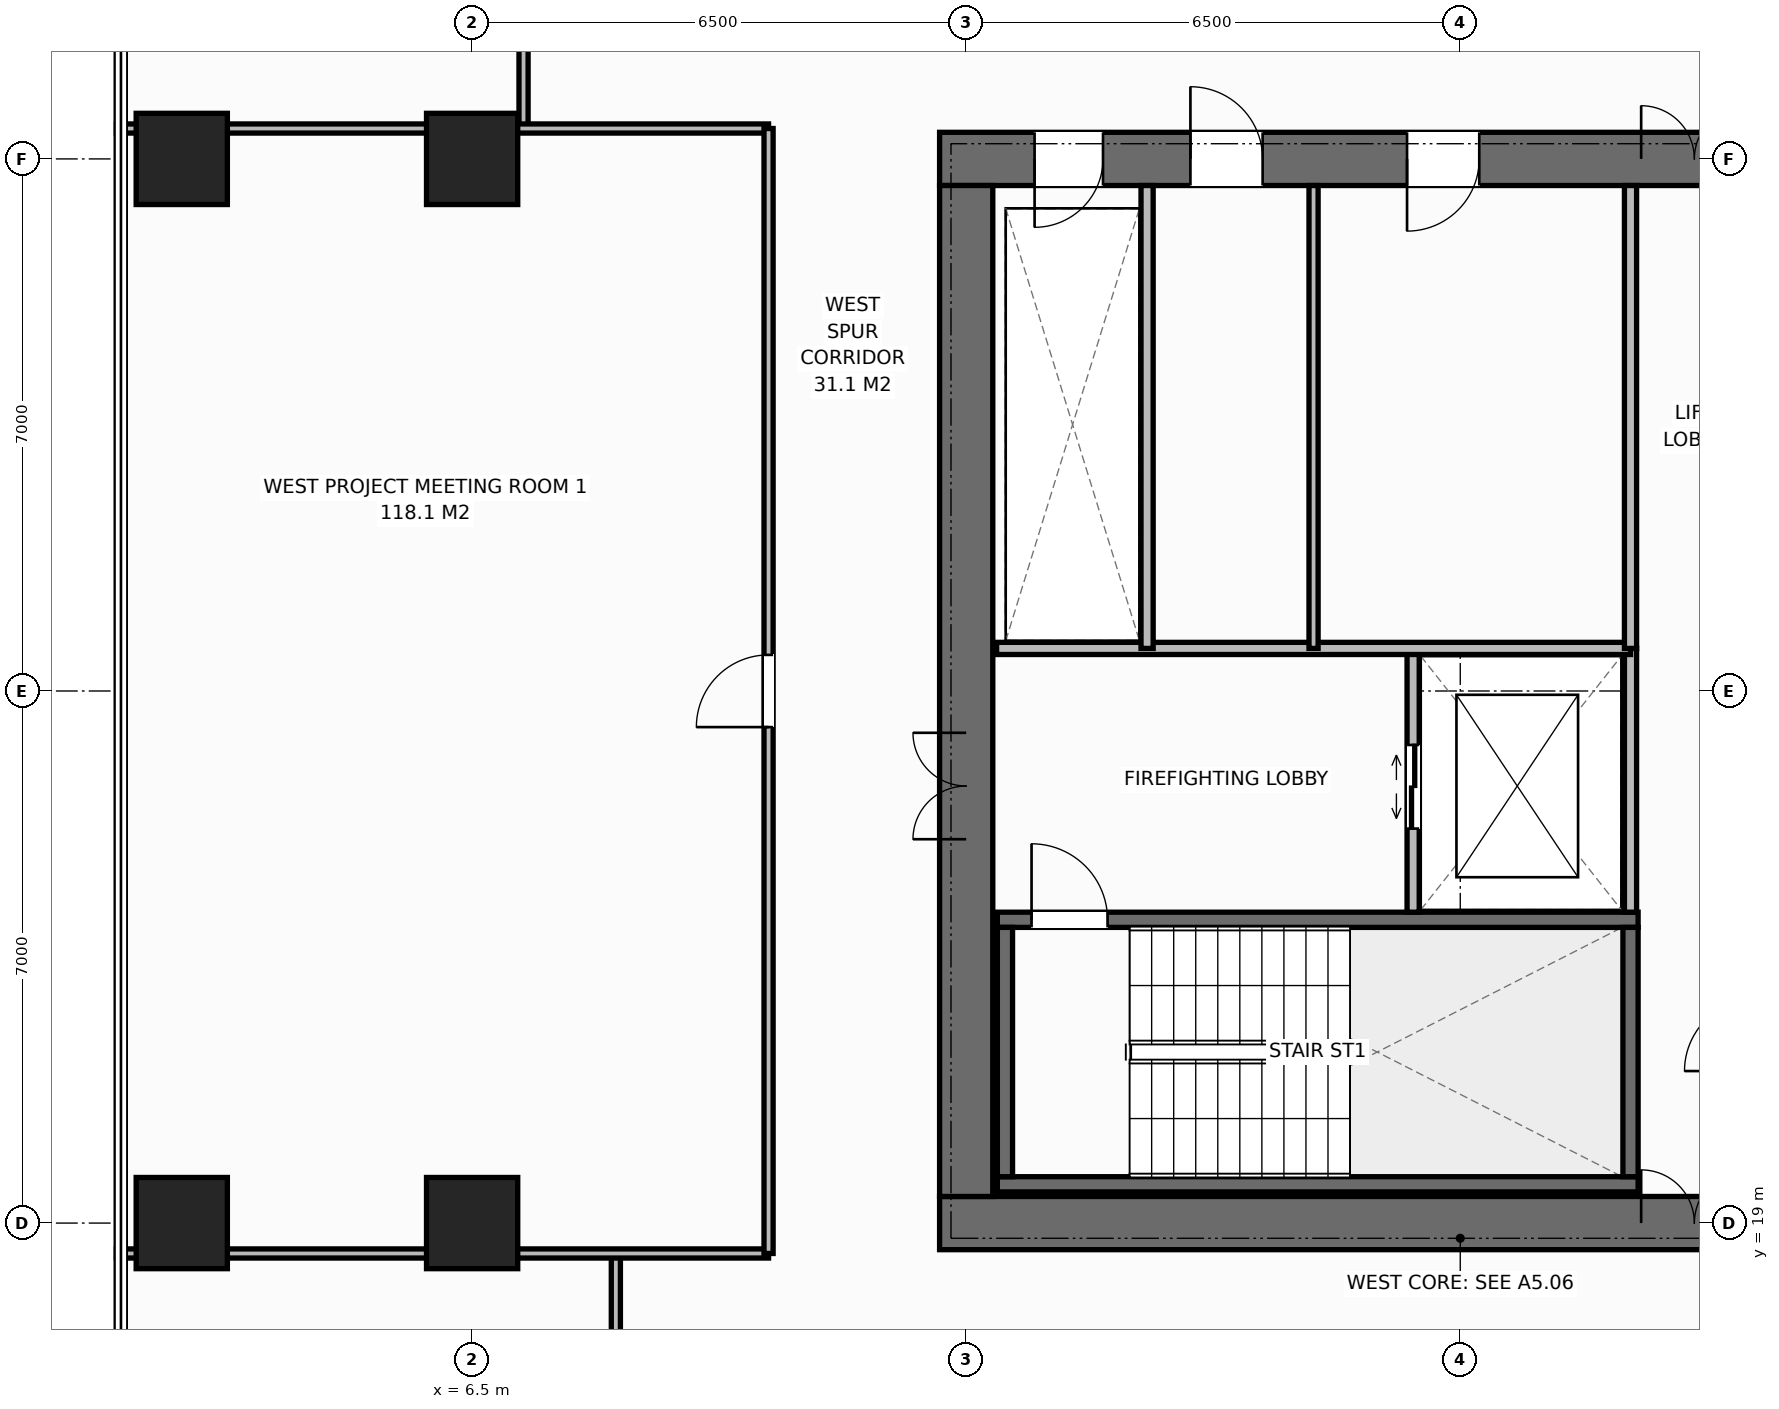
"""IFC4 building model, lengths in metres.
Left out: names, types, materials, properties, quantities, classifications, styles, units other than length and angle.
Written with IfcOpenShell. Run it as: python <this file> out.ifc"""

import sys

from ifc_helpers import new_model, si_unit, direction, frame, frame_2d, origin, origin_2d, place, context, subcontext, project, spatial, rectangle, extrude, element, fill, save


model = new_model("IFC4")
c1 = context("Model", 3, precision=1e-05, world=origin(), true_north=direction((0.0, 1.0)))
c2 = subcontext(c1, "Body", "Model", "MODEL_VIEW")
j1 = project(units=[si_unit("LENGTHUNIT", "METRE"), si_unit("PLANEANGLEUNIT", "RADIAN")], contexts=[c1])
p1 = place(None, origin())
s1 = spatial("IfcSite", under=j1, at=p1, CompositionType="ELEMENT")
p2 = place(p1, origin())
s2 = spatial("IfcBuilding", under=s1, at=p2, CompositionType="ELEMENT")
p3 = place(p2, frame((0.0, 0.0, 131.6)))
s3 = spatial("IfcBuildingStorey", under=s2, at=p3, CompositionType="ELEMENT", Elevation=131.6)
p4 = place(p3, frame((12.65, 19.0, 0.0), z_axis=(0.0, 0.0, 1.0), x_axis=(1.0, 0.0, 0.0)))
e1 = element("IfcWall", 1, at=p4, inside=s3, PredefinedType="SHEAR", context=c2, shape_type="SweptSolid", body=[
    extrude(rectangle(XDim=13.7, YDim=0.7, at=frame_2d((6.85, 0.0))), origin(), (0.0, 0.0, 1.0), 3.8),
])
p5 = place(p4, frame((9.23, 0.0, 0.0)))
e2 = element("IfcOpeningElement", 2, at=p5, cuts=e1, PredefinedType="OPENING", context=c2, shape_type="SweptSolid", body=[
    extrude(rectangle(XDim=1.4, YDim=2.2, at=frame_2d((0.7, 1.1))), frame((0.0, 0.36, 0.0), z_axis=(0.0, -1.0, 0.0), x_axis=(1.0, 0.0, 0.0)), (0.0, 0.0, 1.0), 0.72),
])
p6 = place(p3, frame((12.65, 33.0, 0.0), z_axis=(0.0, 0.0, 1.0), x_axis=(1.0, 0.0, 0.0)))
e3 = element("IfcWall", 3, at=p6, inside=s3, PredefinedType="SHEAR", context=c2, shape_type="SweptSolid", body=[
    extrude(rectangle(XDim=13.7, YDim=0.7, at=frame_2d((6.85, 0.0))), origin(), (0.0, 0.0, 1.0), 3.8),
])
p7 = place(p6, frame((1.25, 0.0, 0.0)))
e4 = element("IfcOpeningElement", 4, at=p7, cuts=e3, PredefinedType="OPENING", context=c2, shape_type="SweptSolid", body=[
    extrude(rectangle(XDim=0.9, YDim=2.15, at=frame_2d((0.45, 1.075))), frame((0.0, 0.36, 0.0), z_axis=(0.0, -1.0, 0.0), x_axis=(1.0, 0.0, 0.0)), (0.0, 0.0, 1.0), 0.72),
])
p8 = place(p6, frame((3.3, 0.0, 0.0)))
e5 = element("IfcOpeningElement", 5, at=p8, cuts=e3, PredefinedType="OPENING", context=c2, shape_type="SweptSolid", body=[
    extrude(rectangle(XDim=0.95, YDim=2.15, at=frame_2d((0.475, 1.075))), frame((0.0, 0.36, 0.0), z_axis=(0.0, -1.0, 0.0), x_axis=(1.0, 0.0, 0.0)), (0.0, 0.0, 1.0), 0.72),
])
p9 = place(p6, frame((6.15, 0.0, 0.0)))
e6 = element("IfcOpeningElement", 6, at=p9, cuts=e3, PredefinedType="OPENING", context=c2, shape_type="SweptSolid", body=[
    extrude(rectangle(XDim=0.95, YDim=2.15, at=frame_2d((0.475, 1.075))), frame((0.0, 0.36, 0.0), z_axis=(0.0, -1.0, 0.0), x_axis=(1.0, 0.0, 0.0)), (0.0, 0.0, 1.0), 0.72),
])
p10 = place(p6, frame((9.23, 0.0, 0.0)))
e7 = element("IfcOpeningElement", 7, at=p10, cuts=e3, PredefinedType="OPENING", context=c2, shape_type="SweptSolid", body=[
    extrude(rectangle(XDim=1.4, YDim=2.2, at=frame_2d((0.7, 1.1))), frame((0.0, 0.36, 0.0), z_axis=(0.0, -1.0, 0.0), x_axis=(1.0, 0.0, 0.0)), (0.0, 0.0, 1.0), 0.72),
])
p11 = place(p3, frame((13.0, 19.35, 0.0), z_axis=(0.0, 0.0, 1.0), x_axis=(0.0, 1.0, 0.0)))
e8 = element("IfcWall", 8, at=p11, inside=s3, PredefinedType="SHEAR", context=c2, shape_type="SweptSolid", body=[
    extrude(rectangle(XDim=13.3, YDim=0.7, at=frame_2d((6.65, 0.0))), origin(), (0.0, 0.0, 1.0), 3.8),
])
p12 = place(p11, frame((4.7, 0.0, 0.0)))
e9 = element("IfcOpeningElement", 9, at=p12, cuts=e8, PredefinedType="OPENING", context=c2, shape_type="SweptSolid", body=[
    extrude(rectangle(XDim=1.4, YDim=2.2, at=frame_2d((0.7, 1.1))), frame((0.0, 0.36, 0.0), z_axis=(0.0, -1.0, 0.0), x_axis=(1.0, 0.0, 0.0)), (0.0, 0.0, 1.0), 0.72),
])
p13 = place(p3, frame((13.41, 19.51, 0.0), z_axis=(0.0, 0.0, 1.0), x_axis=(1.0, 0.0, 0.0)))
e10 = element("IfcWall", 10, at=p13, inside=s3, PredefinedType="SHEAR", context=c2, shape_type="SweptSolid", body=[
    extrude(rectangle(XDim=8.43, YDim=0.2, at=frame_2d((4.215, 0.0))), origin(), (0.0, 0.0, 1.0), 3.8),
])
p14 = place(p3, frame((13.41, 22.99, 0.0), z_axis=(0.0, 0.0, 1.0), x_axis=(1.0, 0.0, 0.0)))
e11 = element("IfcWall", 11, at=p14, inside=s3, PredefinedType="SHEAR", context=c2, shape_type="SweptSolid", body=[
    extrude(rectangle(XDim=8.43, YDim=0.2, at=frame_2d((4.215, 0.0))), origin(), (0.0, 0.0, 1.0), 3.8),
])
p15 = place(p14, frame((0.45, 0.0, 0.0)))
e12 = element("IfcOpeningElement", 12, at=p15, cuts=e11, PredefinedType="OPENING", context=c2, shape_type="SweptSolid", body=[
    extrude(rectangle(XDim=1.0, YDim=2.15, at=frame_2d((0.5, 1.075))), frame((0.0, 0.11, 0.0), z_axis=(0.0, -1.0, 0.0), x_axis=(1.0, 0.0, 0.0)), (0.0, 0.0, 1.0), 0.22),
])
for number, where, z_axis, x_axis in (
    (13, (13.51, 19.61, 0.0), (0.0, 0.0, 1.0), (0.0, 1.0, 0.0)),
    (14, (21.74, 19.61, 0.0), (0.0, 0.0, 1.0), (0.0, 1.0, 0.0)),
):
    element("IfcWall", number, at=place(p3, frame(where, z_axis=z_axis, x_axis=x_axis)), inside=s3, PredefinedType="SHEAR", context=c2, shape_type="SweptSolid", body=[
        extrude(rectangle(XDim=3.28, YDim=0.2, at=frame_2d((1.64, 0.0))), origin(), (0.0, 0.0, 1.0), 3.8),
    ])
for number, where, z_axis, x_axis in (
    (15, (6.5, 19.0, 0.0), (0.0, 0.0, 1.0), (1.0, 0.0, 0.0)),
    (16, (6.5, 33.0, 0.0), (0.0, 0.0, 1.0), (1.0, 0.0, 0.0)),
    (17, (2.68, 19.0, 0.0), (0.0, 0.0, 1.0), (1.0, 0.0, 0.0)),
    (18, (2.68, 33.0, 0.0), (0.0, 0.0, 1.0), (1.0, 0.0, 0.0)),
):
    element("IfcColumn", number, at=place(p3, frame(where, z_axis=z_axis, x_axis=x_axis)), inside=s3, PredefinedType="COLUMN", context=c2, shape_type="SweptSolid", body=[
        extrude(rectangle(XDim=1.2, YDim=1.2, at=origin_2d()), origin(), (0.0, 0.0, 1.0), 3.8),
    ])
p16 = place(p3, frame((21.74, 23.09, 0.0), z_axis=(0.0, 0.0, 1.0), x_axis=(0.0, 1.0, 0.0)))
e19 = element("IfcWall", 19, at=p16, inside=s3, PredefinedType="STANDARD", context=c2, shape_type="SweptSolid", body=[
    extrude(rectangle(XDim=3.47, YDim=0.16, at=frame_2d((1.735, 0.0))), origin(), (0.0, 0.0, 1.0), 3.565),
])
p17 = place(p3, frame((18.88, 23.09, 0.0), z_axis=(0.0, 0.0, 1.0), x_axis=(0.0, 1.0, 0.0)))
e20 = element("IfcWall", 20, at=p17, inside=s3, PredefinedType="STANDARD", context=c2, shape_type="SweptSolid", body=[
    extrude(rectangle(XDim=3.47, YDim=0.16, at=frame_2d((1.735, 0.0))), origin(), (0.0, 0.0, 1.0), 3.565),
])
p18 = place(p17, frame((1.1, 0.0, 0.0)))
e21 = element("IfcOpeningElement", 21, at=p18, cuts=e20, PredefinedType="OPENING", context=c2, shape_type="SweptSolid", body=[
    extrude(rectangle(XDim=1.1, YDim=2.2, at=frame_2d((0.55, 1.1))), frame((0.0, 0.09, 0.0), z_axis=(0.0, -1.0, 0.0), x_axis=(1.0, 0.0, 0.0)), (0.0, 0.0, 1.0), 0.18),
])
p19 = place(p3, frame((13.4, 26.56, 0.0), z_axis=(0.0, 0.0, 1.0), x_axis=(1.0, 0.0, 0.0)))
e22 = element("IfcWall", 22, at=p19, inside=s3, PredefinedType="STANDARD", context=c2, shape_type="SweptSolid", body=[
    extrude(rectangle(XDim=8.34, YDim=0.16, at=frame_2d((4.17, 0.0))), origin(), (0.0, 0.0, 1.0), 3.565),
])
p20 = place(p3, frame((15.38, 26.56, 0.0), z_axis=(0.0, 0.0, 1.0), x_axis=(0.0, 1.0, 0.0)))
e23 = element("IfcWall", 23, at=p20, inside=s3, PredefinedType="STANDARD", context=c2, shape_type="SweptSolid", body=[
    extrude(rectangle(XDim=6.09, YDim=0.16, at=frame_2d((3.045, 0.0))), origin(), (0.0, 0.0, 1.0), 3.565),
])
p21 = place(p3, frame((17.57, 26.56, 0.0), z_axis=(0.0, 0.0, 1.0), x_axis=(0.0, 1.0, 0.0)))
e24 = element("IfcWall", 24, at=p21, inside=s3, PredefinedType="PARTITIONING", context=c2, shape_type="SweptSolid", body=[
    extrude(rectangle(XDim=6.09, YDim=0.12, at=frame_2d((3.045, 0.0))), origin(), (0.0, 0.0, 1.0), 3.565),
])
p22 = place(p3, frame((21.74, 26.56, 0.0), z_axis=(0.0, 0.0, 1.0), x_axis=(0.0, 1.0, 0.0)))
e25 = element("IfcWall", 25, at=p22, inside=s3, PredefinedType="STANDARD", context=c2, shape_type="SweptSolid", body=[
    extrude(rectangle(XDim=6.09, YDim=0.16, at=frame_2d((3.045, 0.0))), origin(), (0.0, 0.0, 1.0), 3.565),
])
for number, where, z_axis, x_axis in (
    (26, (7.177, 33.4, 0.0), (0.0, 0.0, 1.0), (0.0, 1.0, 0.0)),
    (27, (8.391, 16.5, 0.0), (0.0, 0.0, 1.0), (0.0, 1.0, 0.0)),
):
    element("IfcWall", number, at=place(p3, frame(where, z_axis=z_axis, x_axis=x_axis)), inside=s3, PredefinedType="PARTITIONING", context=c2, shape_type="SweptSolid", body=[
        extrude(rectangle(XDim=2.1, YDim=0.12, at=frame_2d((1.05, 0.0))), origin(), (0.0, 0.0, 1.0), 3.565),
    ])
for number, where, z_axis, x_axis in (
    (28, (1.82, 18.6, 0.0), (0.0, 0.0, 1.0), (1.0, 0.0, 0.0)),
    (29, (1.82, 33.4, 0.0), (0.0, 0.0, 1.0), (1.0, 0.0, 0.0)),
):
    element("IfcWall", number, at=place(p3, frame(where, z_axis=z_axis, x_axis=x_axis)), inside=s3, PredefinedType="PARTITIONING", context=c2, shape_type="SweptSolid", body=[
        extrude(rectangle(XDim=8.58, YDim=0.12, at=frame_2d((4.29, 0.0))), origin(), (0.0, 0.0, 1.0), 3.565),
    ])
p23 = place(p3, frame((10.4, 18.6, 0.0), z_axis=(0.0, 0.0, 1.0), x_axis=(0.0, 1.0, 0.0)))
e30 = element("IfcWall", 30, at=p23, inside=s3, PredefinedType="PARTITIONING", context=c2, shape_type="SweptSolid", body=[
    extrude(rectangle(XDim=14.8, YDim=0.12, at=frame_2d((7.4, 0.0))), origin(), (0.0, 0.0, 1.0), 3.565),
])
p24 = place(p23, frame((6.925, 0.0, 0.0)))
e31 = element("IfcOpeningElement", 31, at=p24, cuts=e30, PredefinedType="OPENING", context=c2, shape_type="SweptSolid", body=[
    extrude(rectangle(XDim=0.95, YDim=2.15, at=frame_2d((0.475, 1.075))), frame((0.0, 0.07, 0.0), z_axis=(0.0, -1.0, 0.0), x_axis=(1.0, 0.0, 0.0)), (0.0, 0.0, 1.0), 0.14),
])
p25 = place(p15, origin())
e32 = element("IfcDoor", 32, at=p25, inside=s3, OperationType="SINGLE_SWING_LEFT", PredefinedType="DOOR", context=c2, shape_type="SweptSolid", body=[
    extrude(rectangle(XDim=1.0, YDim=2.15, at=frame_2d((0.5, 1.075))), frame((0.0, 0.025, 0.0), z_axis=(0.0, -1.0, 0.0), x_axis=(1.0, 0.0, 0.0)), (0.0, 0.0, 1.0), 0.05),
])
fill(e12, e32)
p26 = place(p12, origin())
e33 = element("IfcDoor", 33, at=p26, inside=s3, OperationType="DOUBLE_DOOR_SINGLE_SWING", PredefinedType="DOOR", context=c2, shape_type="SweptSolid", body=[
    extrude(rectangle(XDim=1.4, YDim=2.2, at=frame_2d((0.7, 1.1))), frame((0.0, 0.025, 0.0), z_axis=(0.0, -1.0, 0.0), x_axis=(1.0, 0.0, 0.0)), (0.0, 0.0, 1.0), 0.05),
])
fill(e9, e33)
p27 = place(p18, origin())
e34 = element("IfcDoor", 34, at=p27, inside=s3, OperationType="DOUBLE_DOOR_SLIDING", PredefinedType="DOOR", context=c2, shape_type="SweptSolid", body=[
    extrude(rectangle(XDim=1.1, YDim=2.2, at=frame_2d((0.55, 1.1))), frame((0.0, 0.025, 0.0), z_axis=(0.0, -1.0, 0.0), x_axis=(1.0, 0.0, 0.0)), (0.0, 0.0, 1.0), 0.05),
])
fill(e21, e34)
p28 = place(p7, origin())
e35 = element("IfcDoor", 35, at=p28, inside=s3, OperationType="SINGLE_SWING_RIGHT", PredefinedType="DOOR", context=c2, shape_type="SweptSolid", body=[
    extrude(rectangle(XDim=0.9, YDim=2.15, at=frame_2d((0.45, 1.075))), frame((0.0, -0.075, 0.0), z_axis=(0.0, -1.0, 0.0), x_axis=(1.0, 0.0, 0.0)), (0.0, 0.0, 1.0), 0.05),
])
fill(e4, e35)
p29 = place(p8, origin())
e36 = element("IfcDoor", 36, at=p29, inside=s3, OperationType="SINGLE_SWING_LEFT", PredefinedType="DOOR", context=c2, shape_type="SweptSolid", body=[
    extrude(rectangle(XDim=0.95, YDim=2.15, at=frame_2d((0.475, 1.075))), frame((0.0, -0.075, 0.0), z_axis=(0.0, -1.0, 0.0), x_axis=(1.0, 0.0, 0.0)), (0.0, 0.0, 1.0), 0.05),
])
fill(e5, e36)
p30 = place(p9, origin())
e37 = element("IfcDoor", 37, at=p30, inside=s3, OperationType="SINGLE_SWING_RIGHT", PredefinedType="DOOR", context=c2, shape_type="SweptSolid", body=[
    extrude(rectangle(XDim=0.95, YDim=2.15, at=frame_2d((0.475, 1.075))), frame((0.0, -0.075, 0.0), z_axis=(0.0, -1.0, 0.0), x_axis=(1.0, 0.0, 0.0)), (0.0, 0.0, 1.0), 0.05),
])
fill(e6, e37)
p31 = place(p5, origin())
e38 = element("IfcDoor", 38, at=p31, inside=s3, OperationType="DOUBLE_DOOR_SINGLE_SWING", PredefinedType="DOOR", context=c2, shape_type="SweptSolid", body=[
    extrude(rectangle(XDim=1.4, YDim=2.2, at=frame_2d((0.7, 1.1))), frame((0.0, 0.125, 0.0), z_axis=(0.0, -1.0, 0.0), x_axis=(1.0, 0.0, 0.0)), (0.0, 0.0, 1.0), 0.05),
])
fill(e2, e38)
p32 = place(p10, origin())
e39 = element("IfcDoor", 39, at=p32, inside=s3, OperationType="DOUBLE_DOOR_SINGLE_SWING", PredefinedType="DOOR", context=c2, shape_type="SweptSolid", body=[
    extrude(rectangle(XDim=1.4, YDim=2.2, at=frame_2d((0.7, 1.1))), frame((0.0, -0.075, 0.0), z_axis=(0.0, -1.0, 0.0), x_axis=(1.0, 0.0, 0.0)), (0.0, 0.0, 1.0), 0.05),
])
fill(e7, e39)
p33 = place(p24, origin())
e40 = element("IfcDoor", 40, at=p33, inside=s3, OperationType="SINGLE_SWING_LEFT", PredefinedType="DOOR", context=c2, shape_type="SweptSolid", body=[
    extrude(rectangle(XDim=0.95, YDim=2.15, at=frame_2d((0.475, 1.075))), frame((0.0, 0.025, 0.0), z_axis=(0.0, -1.0, 0.0), x_axis=(1.0, 0.0, 0.0)), (0.0, 0.0, 1.0), 0.05),
])
fill(e31, e40)
save(model, sys.argv[1])
